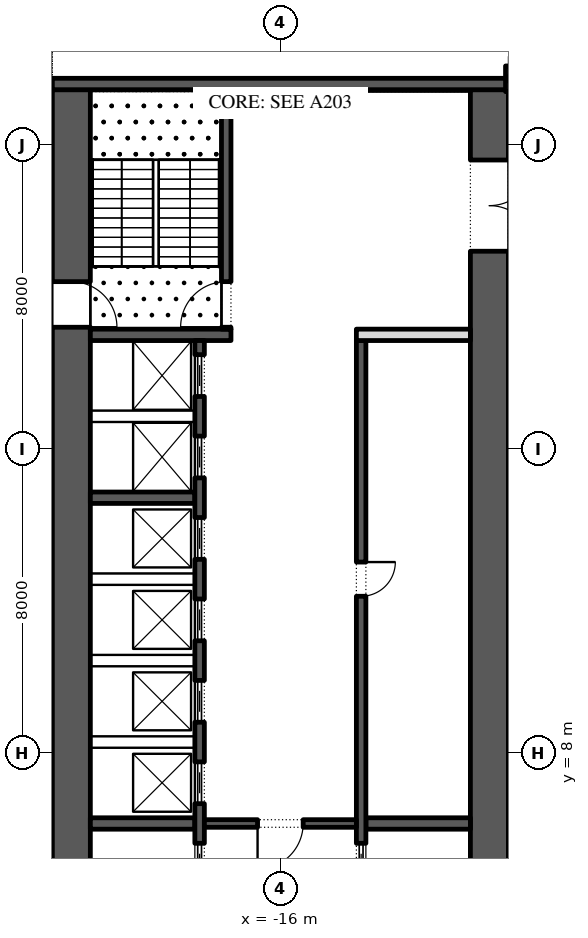
"""IFC4 building model, lengths in metres.
Left out: names, types, materials, properties, quantities, classifications, styles, units other than length and angle.
Written with IfcOpenShell. Run it as: python <this file> out.ifc"""

import sys

from ifc_helpers import new_model, si_unit, direction, frame, frame_2d, origin, place, context, subcontext, project, spatial, rectangle, extrude, element, fill, save


model = new_model("IFC4")
c1 = context("Model", 3, precision=1e-05, world=origin(), true_north=direction((0.0, 1.0)))
c2 = subcontext(c1, "Body", "Model", "MODEL_VIEW")
j1 = project(units=[si_unit("LENGTHUNIT", "METRE"), si_unit("PLANEANGLEUNIT", "RADIAN")], contexts=[c1])
p1 = place(None, origin())
s1 = spatial("IfcSite", under=j1, at=p1, CompositionType="ELEMENT")
p2 = place(p1, origin())
s2 = spatial("IfcBuilding", under=s1, at=p2, CompositionType="ELEMENT")
p3 = place(p2, origin())
s3 = spatial("IfcBuildingStorey", under=s2, at=p3, CompositionType="ELEMENT", Elevation=0.0)
p4 = place(p3, frame((-21.5, -2.45, 0.0), z_axis=(0.0, 0.0, 1.0), x_axis=(0.0, 1.0, 0.0)))
e1 = element("IfcWall", 1, at=p4, inside=s3, PredefinedType="SHEAR", context=c2, shape_type="SweptSolid", body=[
    extrude(rectangle(XDim=27.9, YDim=1.0, at=frame_2d((13.95, 0.0))), origin(), (0.0, 0.0, 1.0), 7.7),
])
p5 = place(p4, frame((5.05, 0.0, 0.0)))
e2 = element("IfcOpeningElement", 2, at=p5, cuts=e1, PredefinedType="OPENING", context=c2, shape_type="SweptSolid", body=[
    extrude(rectangle(XDim=1.2, YDim=2.1, at=frame_2d((0.6, 1.05))), frame((0.0, 0.51, 0.0), z_axis=(0.0, -1.0, 0.0), x_axis=(1.0, 0.0, 0.0)), (0.0, 0.0, 1.0), 1.02),
])
p6 = place(p4, frame((21.65, 0.0, 0.0)))
e3 = element("IfcOpeningElement", 3, at=p6, cuts=e1, PredefinedType="OPENING", context=c2, shape_type="SweptSolid", body=[
    extrude(rectangle(XDim=1.2, YDim=2.1, at=frame_2d((0.6, 1.05))), frame((0.0, 0.51, 0.0), z_axis=(0.0, -1.0, 0.0), x_axis=(1.0, 0.0, 0.0)), (0.0, 0.0, 1.0), 1.02),
])
p7 = place(p3, frame((-10.5, -2.45, 0.0), z_axis=(0.0, 0.0, 1.0), x_axis=(0.0, 1.0, 0.0)))
e4 = element("IfcWall", 4, at=p7, inside=s3, PredefinedType="SHEAR", context=c2, shape_type="SweptSolid", body=[
    extrude(rectangle(XDim=27.9, YDim=1.0, at=frame_2d((13.95, 0.0))), origin(), (0.0, 0.0, 1.0), 7.7),
])
p8 = place(p7, frame((23.65, 0.0, 0.0)))
e5 = element("IfcOpeningElement", 5, at=p8, cuts=e4, PredefinedType="OPENING", context=c2, shape_type="SweptSolid", body=[
    extrude(rectangle(XDim=2.4, YDim=2.1, at=frame_2d((1.2, 1.05))), frame((0.0, 0.51, 0.0), z_axis=(0.0, -1.0, 0.0), x_axis=(1.0, 0.0, 0.0)), (0.0, 0.0, 1.0), 1.02),
])
p9 = place(p7, frame((1.087, 0.0, 0.0)))
e6 = element("IfcOpeningElement", 6, at=p9, cuts=e4, PredefinedType="OPENING", context=c2, shape_type="SweptSolid", body=[
    extrude(rectangle(XDim=0.9, YDim=2.1, at=frame_2d((0.45, 1.05))), frame((0.0, 0.51, 0.0), z_axis=(0.0, -1.0, 0.0), x_axis=(1.0, 0.0, 0.0)), (0.0, 0.0, 1.0), 1.02),
])
p10 = place(p7, frame((4.312, 0.0, 0.0)))
e7 = element("IfcOpeningElement", 7, at=p10, cuts=e4, PredefinedType="OPENING", context=c2, shape_type="SweptSolid", body=[
    extrude(rectangle(XDim=0.9, YDim=2.1, at=frame_2d((0.45, 1.05))), frame((0.0, 0.51, 0.0), z_axis=(0.0, -1.0, 0.0), x_axis=(1.0, 0.0, 0.0)), (0.0, 0.0, 1.0), 1.02),
])
p11 = place(p3, frame((-22.0, 25.6, 0.0), z_axis=(0.0, 0.0, 1.0), x_axis=(1.0, 0.0, 0.0)))
e8 = element("IfcWall", 8, at=p11, inside=s3, PredefinedType="SHEAR", context=c2, shape_type="SweptSolid", body=[
    extrude(rectangle(XDim=12.0, YDim=0.3, at=frame_2d((6.0, 0.0))), origin(), (0.0, 0.0, 1.0), 7.7),
])
p12 = place(p3, frame((-21.0, 19.0, 0.0), z_axis=(0.0, 0.0, 1.0), x_axis=(1.0, 0.0, 0.0)))
e9 = element("IfcWall", 9, at=p12, inside=s3, PredefinedType="SHEAR", context=c2, shape_type="SweptSolid", body=[
    extrude(rectangle(XDim=3.7, YDim=0.3, at=frame_2d((1.85, 0.0))), origin(), (0.0, 0.0, 1.0), 7.7),
])
p13 = place(p3, frame((-17.425, 19.15, 0.0), z_axis=(0.0, 0.0, 1.0), x_axis=(0.0, 1.0, 0.0)))
e10 = element("IfcWall", 10, at=p13, inside=s3, PredefinedType="SHEAR", context=c2, shape_type="SweptSolid", body=[
    extrude(rectangle(XDim=6.3, YDim=0.25, at=frame_2d((3.15, 0.0))), origin(), (0.0, 0.0, 1.0), 7.7),
])
p14 = place(p13, frame((0.05, 0.0, 0.0)))
e11 = element("IfcOpeningElement", 11, at=p14, cuts=e10, PredefinedType="OPENING", context=c2, shape_type="SweptSolid", body=[
    extrude(rectangle(XDim=1.2, YDim=2.1, at=frame_2d((0.6, 1.05))), frame((0.0, 0.135, 0.0), z_axis=(0.0, -1.0, 0.0), x_axis=(1.0, 0.0, 0.0)), (0.0, 0.0, 1.0), 0.27),
])
for number, where, z_axis, x_axis in (
    (12, (-21.0, 6.143, 0.0), (0.0, 0.0, 1.0), (1.0, 0.0, 0.0)),
    (13, (-21.0, 14.714, 0.0), (0.0, 0.0, 1.0), (1.0, 0.0, 0.0)),
):
    element("IfcWall", number, at=place(p3, frame(where, z_axis=z_axis, x_axis=x_axis)), inside=s3, PredefinedType="SHEAR", context=c2, shape_type="SweptSolid", body=[
        extrude(rectangle(XDim=2.75, YDim=0.3, at=frame_2d((1.375, 0.0))), origin(), (0.0, 0.0, 1.0), 7.7),
    ])
p15 = place(p3, frame((-18.125, 4.15, 0.0), z_axis=(0.0, 0.0, 1.0), x_axis=(0.0, 1.0, 0.0)))
e14 = element("IfcWall", 14, at=p15, inside=s3, PredefinedType="SHEAR", context=c2, shape_type="SweptSolid", body=[
    extrude(rectangle(XDim=14.7, YDim=0.25, at=frame_2d((7.35, 0.0))), origin(), (0.0, 0.0, 1.0), 7.7),
])
p16 = place(p15, frame((0.371, 0.0, 0.0)))
e15 = element("IfcOpeningElement", 15, at=p16, cuts=e14, PredefinedType="OPENING", context=c2, shape_type="SweptSolid", body=[
    extrude(rectangle(XDim=1.1, YDim=2.1, at=frame_2d((0.55, 1.05))), frame((0.0, 0.135, 0.0), z_axis=(0.0, -1.0, 0.0), x_axis=(1.0, 0.0, 0.0)), (0.0, 0.0, 1.0), 0.27),
])
p17 = place(p15, frame((2.514, 0.0, 0.0)))
e16 = element("IfcOpeningElement", 16, at=p17, cuts=e14, PredefinedType="OPENING", context=c2, shape_type="SweptSolid", body=[
    extrude(rectangle(XDim=1.1, YDim=2.1, at=frame_2d((0.55, 1.05))), frame((0.0, 0.135, 0.0), z_axis=(0.0, -1.0, 0.0), x_axis=(1.0, 0.0, 0.0)), (0.0, 0.0, 1.0), 0.27),
])
p18 = place(p15, frame((4.657, 0.0, 0.0)))
e17 = element("IfcOpeningElement", 17, at=p18, cuts=e14, PredefinedType="OPENING", context=c2, shape_type="SweptSolid", body=[
    extrude(rectangle(XDim=1.1, YDim=2.1, at=frame_2d((0.55, 1.05))), frame((0.0, 0.135, 0.0), z_axis=(0.0, -1.0, 0.0), x_axis=(1.0, 0.0, 0.0)), (0.0, 0.0, 1.0), 0.27),
])
p19 = place(p15, frame((6.8, 0.0, 0.0)))
e18 = element("IfcOpeningElement", 18, at=p19, cuts=e14, PredefinedType="OPENING", context=c2, shape_type="SweptSolid", body=[
    extrude(rectangle(XDim=1.1, YDim=2.1, at=frame_2d((0.55, 1.05))), frame((0.0, 0.135, 0.0), z_axis=(0.0, -1.0, 0.0), x_axis=(1.0, 0.0, 0.0)), (0.0, 0.0, 1.0), 0.27),
])
p20 = place(p15, frame((8.943, 0.0, 0.0)))
e19 = element("IfcOpeningElement", 19, at=p20, cuts=e14, PredefinedType="OPENING", context=c2, shape_type="SweptSolid", body=[
    extrude(rectangle(XDim=1.1, YDim=2.1, at=frame_2d((0.55, 1.05))), frame((0.0, 0.135, 0.0), z_axis=(0.0, -1.0, 0.0), x_axis=(1.0, 0.0, 0.0)), (0.0, 0.0, 1.0), 0.27),
])
p21 = place(p15, frame((11.086, 0.0, 0.0)))
e20 = element("IfcOpeningElement", 20, at=p21, cuts=e14, PredefinedType="OPENING", context=c2, shape_type="SweptSolid", body=[
    extrude(rectangle(XDim=1.1, YDim=2.1, at=frame_2d((0.55, 1.05))), frame((0.0, 0.135, 0.0), z_axis=(0.0, -1.0, 0.0), x_axis=(1.0, 0.0, 0.0)), (0.0, 0.0, 1.0), 0.27),
])
p22 = place(p15, frame((13.229, 0.0, 0.0)))
e21 = element("IfcOpeningElement", 21, at=p22, cuts=e14, PredefinedType="OPENING", context=c2, shape_type="SweptSolid", body=[
    extrude(rectangle(XDim=1.1, YDim=2.1, at=frame_2d((0.55, 1.05))), frame((0.0, 0.135, 0.0), z_axis=(0.0, -1.0, 0.0), x_axis=(1.0, 0.0, 0.0)), (0.0, 0.0, 1.0), 0.27),
])
p23 = place(p3, frame((-13.75, 6.143, 0.0), z_axis=(0.0, 0.0, 1.0), x_axis=(1.0, 0.0, 0.0)))
e22 = element("IfcWall", 22, at=p23, inside=s3, PredefinedType="SHEAR", context=c2, shape_type="SweptSolid", body=[
    extrude(rectangle(XDim=2.75, YDim=0.3, at=frame_2d((1.375, 0.0))), origin(), (0.0, 0.0, 1.0), 7.7),
])
p24 = place(p3, frame((-13.875, -2.45, 0.0), z_axis=(0.0, 0.0, 1.0), x_axis=(0.0, 1.0, 0.0)))
e23 = element("IfcWall", 23, at=p24, inside=s3, PredefinedType="SHEAR", context=c2, shape_type="SweptSolid", body=[
    extrude(rectangle(XDim=21.3, YDim=0.25, at=frame_2d((10.65, 0.0))), origin(), (0.0, 0.0, 1.0), 7.7),
])
p25 = place(p24, frame((14.571, 0.0, 0.0)))
e24 = element("IfcOpeningElement", 24, at=p25, cuts=e23, PredefinedType="OPENING", context=c2, shape_type="SweptSolid", body=[
    extrude(rectangle(XDim=0.9, YDim=2.1, at=frame_2d((0.45, 1.05))), frame((0.0, 0.135, 0.0), z_axis=(0.0, -1.0, 0.0), x_axis=(1.0, 0.0, 0.0)), (0.0, 0.0, 1.0), 0.27),
])
p26 = place(p24, frame((6.971, 0.0, 0.0)))
e25 = element("IfcOpeningElement", 25, at=p26, cuts=e23, PredefinedType="OPENING", context=c2, shape_type="SweptSolid", body=[
    extrude(rectangle(XDim=1.1, YDim=2.1, at=frame_2d((0.55, 1.05))), frame((0.0, 0.135, 0.0), z_axis=(0.0, -1.0, 0.0), x_axis=(1.0, 0.0, 0.0)), (0.0, 0.0, 1.0), 0.27),
])
p27 = place(p3, frame((-14.0, 19.0, 0.0), z_axis=(0.0, 0.0, 1.0), x_axis=(1.0, 0.0, 0.0)))
e26 = element("IfcWall", 26, at=p27, inside=s3, PredefinedType="PARTITIONING", context=c2, shape_type="SweptSolid", body=[
    extrude(rectangle(XDim=3.0, YDim=0.3, at=frame_2d((1.5, 0.0))), origin(), (0.0, 0.0, 1.0), 7.7),
])
p28 = place(p3, frame((-18.0, 6.143, 0.0), z_axis=(0.0, 0.0, 1.0), x_axis=(1.0, 0.0, 0.0)))
e27 = element("IfcWall", 27, at=p28, inside=s3, PredefinedType="SHEAR", context=c2, shape_type="SweptSolid", body=[
    extrude(rectangle(XDim=4.0, YDim=0.2, at=frame_2d((2.0, 0.0))), origin(), (0.0, 0.0, 1.0), 7.7),
])
p29 = place(p28, frame((1.4, 0.0, 0.0)))
e28 = element("IfcOpeningElement", 28, at=p29, cuts=e27, PredefinedType="OPENING", context=c2, shape_type="SweptSolid", body=[
    extrude(rectangle(XDim=1.2, YDim=2.1, at=frame_2d((0.6, 1.05))), frame((0.0, 0.11, 0.0), z_axis=(0.0, -1.0, 0.0), x_axis=(1.0, 0.0, 0.0)), (0.0, 0.0, 1.0), 0.22),
])
p30 = place(p3, frame((-10.0, 25.4, 0.0), z_axis=(0.0, 0.0, 1.0), x_axis=(0.0, 1.0, 0.0)))
e29 = element("IfcWall", 29, at=p30, inside=s3, PredefinedType="PARTITIONING", context=c2, shape_type="SweptSolid", body=[
    extrude(rectangle(XDim=0.675, YDim=0.15, at=frame_2d((0.337, 0.0))), origin(), (0.0, 0.0, 1.0), 7.7),
])
p31 = place(p16, origin())
e30 = element("IfcDoor", 30, at=p31, inside=s3, OperationType="SLIDING_TO_LEFT", PredefinedType="DOOR", context=c2, shape_type="SweptSolid", body=[
    extrude(rectangle(XDim=1.1, YDim=2.1, at=frame_2d((0.55, 1.05))), frame((0.0, 0.025, 0.0), z_axis=(0.0, -1.0, 0.0), x_axis=(1.0, 0.0, 0.0)), (0.0, 0.0, 1.0), 0.05),
])
fill(e15, e30)
p32 = place(p17, origin())
e31 = element("IfcDoor", 31, at=p32, inside=s3, OperationType="SLIDING_TO_LEFT", PredefinedType="DOOR", context=c2, shape_type="SweptSolid", body=[
    extrude(rectangle(XDim=1.1, YDim=2.1, at=frame_2d((0.55, 1.05))), frame((0.0, 0.025, 0.0), z_axis=(0.0, -1.0, 0.0), x_axis=(1.0, 0.0, 0.0)), (0.0, 0.0, 1.0), 0.05),
])
fill(e16, e31)
p33 = place(p18, origin())
e32 = element("IfcDoor", 32, at=p33, inside=s3, OperationType="SLIDING_TO_LEFT", PredefinedType="DOOR", context=c2, shape_type="SweptSolid", body=[
    extrude(rectangle(XDim=1.1, YDim=2.1, at=frame_2d((0.55, 1.05))), frame((0.0, 0.025, 0.0), z_axis=(0.0, -1.0, 0.0), x_axis=(1.0, 0.0, 0.0)), (0.0, 0.0, 1.0), 0.05),
])
fill(e17, e32)
p34 = place(p19, origin())
e33 = element("IfcDoor", 33, at=p34, inside=s3, OperationType="SLIDING_TO_LEFT", PredefinedType="DOOR", context=c2, shape_type="SweptSolid", body=[
    extrude(rectangle(XDim=1.1, YDim=2.1, at=frame_2d((0.55, 1.05))), frame((0.0, 0.025, 0.0), z_axis=(0.0, -1.0, 0.0), x_axis=(1.0, 0.0, 0.0)), (0.0, 0.0, 1.0), 0.05),
])
fill(e18, e33)
p35 = place(p20, origin())
e34 = element("IfcDoor", 34, at=p35, inside=s3, OperationType="SLIDING_TO_LEFT", PredefinedType="DOOR", context=c2, shape_type="SweptSolid", body=[
    extrude(rectangle(XDim=1.1, YDim=2.1, at=frame_2d((0.55, 1.05))), frame((0.0, 0.025, 0.0), z_axis=(0.0, -1.0, 0.0), x_axis=(1.0, 0.0, 0.0)), (0.0, 0.0, 1.0), 0.05),
])
fill(e19, e34)
p36 = place(p21, origin())
e35 = element("IfcDoor", 35, at=p36, inside=s3, OperationType="SLIDING_TO_LEFT", PredefinedType="DOOR", context=c2, shape_type="SweptSolid", body=[
    extrude(rectangle(XDim=1.1, YDim=2.1, at=frame_2d((0.55, 1.05))), frame((0.0, 0.025, 0.0), z_axis=(0.0, -1.0, 0.0), x_axis=(1.0, 0.0, 0.0)), (0.0, 0.0, 1.0), 0.05),
])
fill(e20, e35)
p37 = place(p22, origin())
e36 = element("IfcDoor", 36, at=p37, inside=s3, OperationType="SLIDING_TO_LEFT", PredefinedType="DOOR", context=c2, shape_type="SweptSolid", body=[
    extrude(rectangle(XDim=1.1, YDim=2.1, at=frame_2d((0.55, 1.05))), frame((0.0, 0.025, 0.0), z_axis=(0.0, -1.0, 0.0), x_axis=(1.0, 0.0, 0.0)), (0.0, 0.0, 1.0), 0.05),
])
fill(e21, e36)
p38 = place(p25, frame((0.9, -0.2, 0.0), z_axis=(0.0, 0.0, 1.0), x_axis=(-1.0, 0.0, 0.0)))
e37 = element("IfcDoor", 37, at=p38, inside=s3, OperationType="SINGLE_SWING_RIGHT", PredefinedType="DOOR", context=c2, shape_type="SweptSolid", body=[
    extrude(rectangle(XDim=0.9, YDim=2.1, at=frame_2d((0.45, 1.05))), frame((0.0, -0.075, 0.0), z_axis=(0.0, -1.0, 0.0), x_axis=(1.0, 0.0, 0.0)), (0.0, 0.0, 1.0), 0.05),
])
fill(e24, e37)
p39 = place(p26, origin())
e38 = element("IfcDoor", 38, at=p39, inside=s3, OperationType="SLIDING_TO_LEFT", PredefinedType="DOOR", context=c2, shape_type="SweptSolid", body=[
    extrude(rectangle(XDim=1.1, YDim=2.1, at=frame_2d((0.55, 1.05))), frame((0.0, 0.025, 0.0), z_axis=(0.0, -1.0, 0.0), x_axis=(1.0, 0.0, 0.0)), (0.0, 0.0, 1.0), 0.05),
])
fill(e25, e38)
p40 = place(p29, frame((1.2, 0.0, 0.0), z_axis=(0.0, 0.0, 1.0), x_axis=(-1.0, 0.0, 0.0)))
e39 = element("IfcDoor", 39, at=p40, inside=s3, OperationType="SINGLE_SWING_LEFT", PredefinedType="DOOR", context=c2, shape_type="SweptSolid", body=[
    extrude(rectangle(XDim=1.2, YDim=2.1, at=frame_2d((0.6, 1.05))), frame((0.0, 0.025, 0.0), z_axis=(0.0, -1.0, 0.0), x_axis=(1.0, 0.0, 0.0)), (0.0, 0.0, 1.0), 0.05),
])
fill(e28, e39)
p41 = place(p8, frame((2.4, 0.0, 0.0), z_axis=(0.0, 0.0, 1.0), x_axis=(-1.0, 0.0, 0.0)))
e40 = element("IfcDoor", 40, at=p41, inside=s3, OperationType="DOUBLE_DOOR_SINGLE_SWING", PredefinedType="DOOR", context=c2, shape_type="SweptSolid", body=[
    extrude(rectangle(XDim=2.4, YDim=2.1, at=frame_2d((1.2, 1.05))), frame((0.0, 0.025, 0.0), z_axis=(0.0, -1.0, 0.0), x_axis=(1.0, 0.0, 0.0)), (0.0, 0.0, 1.0), 0.05),
])
fill(e5, e40)
p42 = place(p14, origin())
e41 = element("IfcDoor", 41, at=p42, inside=s3, OperationType="SINGLE_SWING_RIGHT", PredefinedType="DOOR", context=c2, shape_type="SweptSolid", body=[
    extrude(rectangle(XDim=1.2, YDim=2.1, at=frame_2d((0.6, 1.05))), frame((0.0, 0.025, 0.0), z_axis=(0.0, -1.0, 0.0), x_axis=(1.0, 0.0, 0.0)), (0.0, 0.0, 1.0), 0.05),
])
fill(e11, e41)
p43 = place(p6, frame((1.2, 0.0, 0.0), z_axis=(0.0, 0.0, 1.0), x_axis=(-1.0, 0.0, 0.0)))
e42 = element("IfcDoor", 42, at=p43, inside=s3, OperationType="SINGLE_SWING_LEFT", PredefinedType="DOOR", context=c2, shape_type="SweptSolid", body=[
    extrude(rectangle(XDim=1.2, YDim=2.1, at=frame_2d((0.6, 1.05))), frame((0.0, 0.025, 0.0), z_axis=(0.0, -1.0, 0.0), x_axis=(1.0, 0.0, 0.0)), (0.0, 0.0, 1.0), 0.05),
])
fill(e3, e42)
save(model, sys.argv[1])
